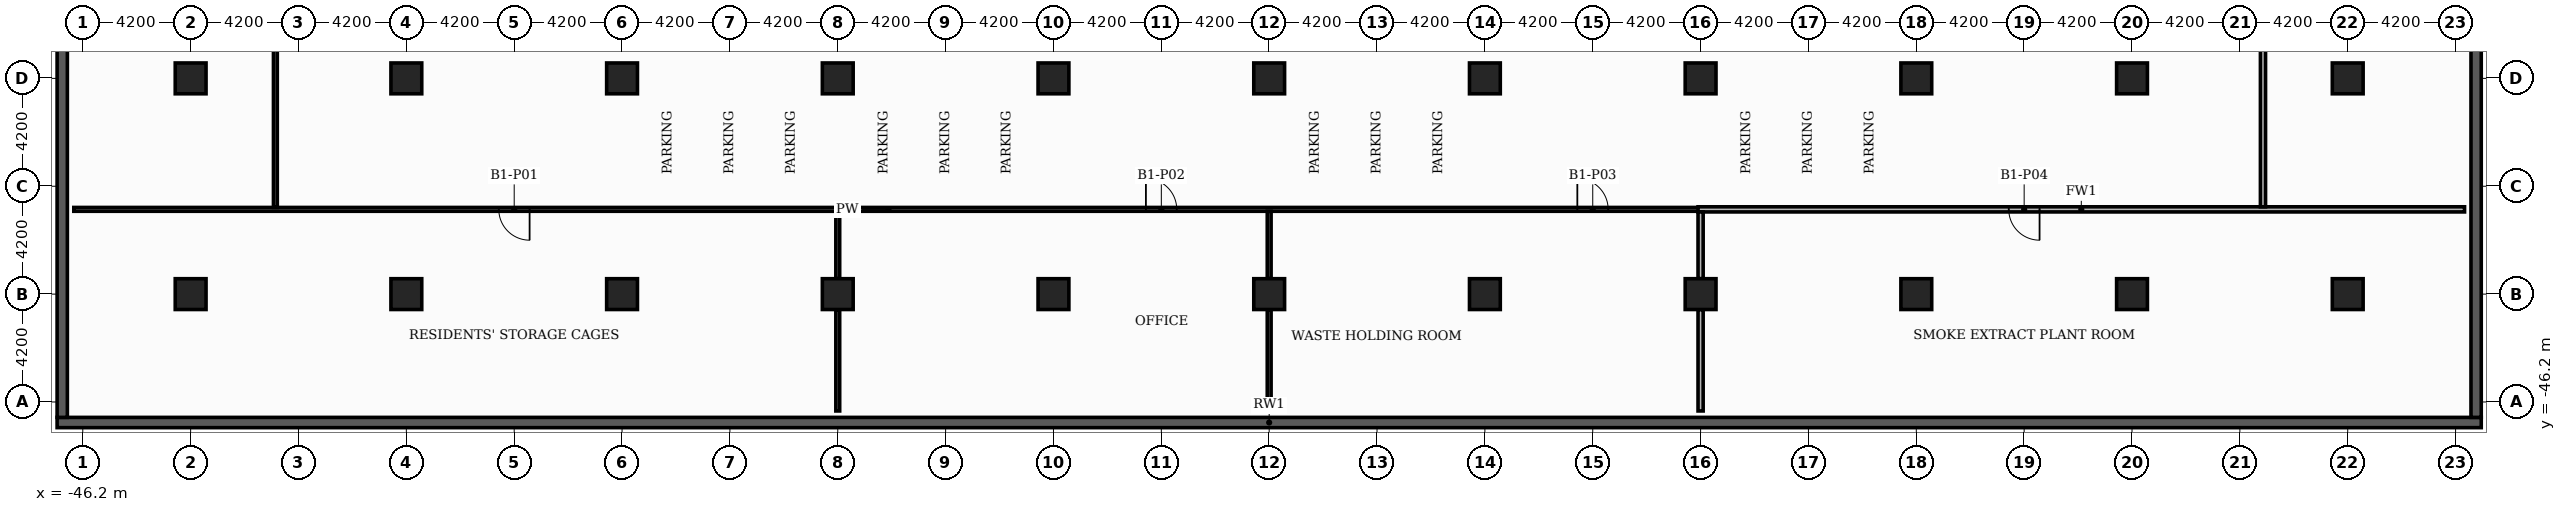
"""IFC4 building model, lengths in metres.
Left out: names, types, materials, properties, quantities, classifications, styles, units other than length and angle.
Written with IfcOpenShell. Run it as: python <this file> out.ifc"""

import sys

from ifc_helpers import new_model, si_unit, direction, frame, frame_2d, origin, origin_2d, place, context, subcontext, project, spatial, rectangle, extrude, element, fill, save


model = new_model("IFC4")
c1 = context("Model", 3, precision=1e-05, world=origin(), true_north=direction((0.0, 1.0)))
c2 = subcontext(c1, "Body", "Model", "MODEL_VIEW")
j1 = project(units=[si_unit("LENGTHUNIT", "METRE"), si_unit("PLANEANGLEUNIT", "RADIAN")], contexts=[c1])
p1 = place(None, origin())
s1 = spatial("IfcSite", under=j1, at=p1, CompositionType="ELEMENT")
p2 = place(p1, origin())
s2 = spatial("IfcBuilding", under=s1, at=p2, CompositionType="ELEMENT")
p3 = place(p2, frame((0.0, 0.0, -4.2)))
s3 = spatial("IfcBuildingStorey", under=s2, at=p3, CompositionType="ELEMENT", Elevation=-4.2)
p4 = place(p3, frame((-47.2, -47.0, 0.0), z_axis=(0.0, 0.0, 1.0), x_axis=(1.0, 0.0, 0.0)))
e1 = element("IfcWall", 1, at=p4, inside=s3, PredefinedType="USERDEFINED", context=c2, shape_type="SweptSolid", body=[
    extrude(rectangle(XDim=94.4, YDim=0.4, at=frame_2d((47.2, 0.0))), origin(), (0.0, 0.0, 1.0), 4.2),
])
for number, where, z_axis, x_axis in (
    (2, (-47.0, -46.8, 0.0), (0.0, 0.0, 1.0), (0.0, 1.0, 0.0)),
    (3, (47.0, -46.8, 0.0), (0.0, 0.0, 1.0), (0.0, 1.0, 0.0)),
):
    element("IfcWall", number, at=place(p3, frame(where, z_axis=z_axis, x_axis=x_axis)), inside=s3, PredefinedType="USERDEFINED", context=c2, shape_type="SweptSolid", body=[
        extrude(rectangle(XDim=93.6, YDim=0.4, at=frame_2d((46.8, 0.0))), origin(), (0.0, 0.0, 1.0), 4.2),
    ])
for number, where, z_axis, x_axis in (
    (4, (0.0, -33.6, 0.0), (0.0, 0.0, 1.0), (1.0, 0.0, 0.0)),
    (5, (0.0, -42.0, 0.0), (0.0, 0.0, 1.0), (1.0, 0.0, 0.0)),
    (6, (8.4, -33.6, 0.0), (0.0, 0.0, 1.0), (1.0, 0.0, 0.0)),
    (7, (8.4, -42.0, 0.0), (0.0, 0.0, 1.0), (1.0, 0.0, 0.0)),
    (8, (16.8, -33.6, 0.0), (0.0, 0.0, 1.0), (1.0, 0.0, 0.0)),
    (9, (16.8, -42.0, 0.0), (0.0, 0.0, 1.0), (1.0, 0.0, 0.0)),
    (10, (25.2, -33.6, 0.0), (0.0, 0.0, 1.0), (1.0, 0.0, 0.0)),
    (11, (25.2, -42.0, 0.0), (0.0, 0.0, 1.0), (1.0, 0.0, 0.0)),
    (12, (33.6, -33.6, 0.0), (0.0, 0.0, 1.0), (1.0, 0.0, 0.0)),
    (13, (33.6, -42.0, 0.0), (0.0, 0.0, 1.0), (1.0, 0.0, 0.0)),
    (14, (42.0, -33.6, 0.0), (0.0, 0.0, 1.0), (1.0, 0.0, 0.0)),
    (15, (42.0, -42.0, 0.0), (0.0, 0.0, 1.0), (1.0, 0.0, 0.0)),
    (16, (-8.4, -33.6, 0.0), (0.0, 0.0, 1.0), (1.0, 0.0, 0.0)),
    (17, (-8.4, -42.0, 0.0), (0.0, 0.0, 1.0), (1.0, 0.0, 0.0)),
    (18, (-16.8, -33.6, 0.0), (0.0, 0.0, 1.0), (1.0, 0.0, 0.0)),
    (19, (-16.8, -42.0, 0.0), (0.0, 0.0, 1.0), (1.0, 0.0, 0.0)),
    (20, (-25.2, -33.6, 0.0), (0.0, 0.0, 1.0), (1.0, 0.0, 0.0)),
    (21, (-25.2, -42.0, 0.0), (0.0, 0.0, 1.0), (1.0, 0.0, 0.0)),
    (22, (-33.6, -33.6, 0.0), (0.0, 0.0, 1.0), (1.0, 0.0, 0.0)),
    (23, (-33.6, -42.0, 0.0), (0.0, 0.0, 1.0), (1.0, 0.0, 0.0)),
    (24, (-42.0, -33.6, 0.0), (0.0, 0.0, 1.0), (1.0, 0.0, 0.0)),
    (25, (-42.0, -42.0, 0.0), (0.0, 0.0, 1.0), (1.0, 0.0, 0.0)),
):
    element("IfcColumn", number, at=place(p3, frame(where, z_axis=z_axis, x_axis=x_axis)), inside=s3, PredefinedType="COLUMN", context=c2, shape_type="SweptSolid", body=[
        extrude(rectangle(XDim=1.2, YDim=1.2, at=origin_2d()), origin(), (0.0, 0.0, 1.0), 4.2),
    ])
p5 = place(p3, frame((-46.55, -38.7, 0.0), z_axis=(0.0, 0.0, 1.0), x_axis=(1.0, 0.0, 0.0)))
e26 = element("IfcWall", 26, at=p5, inside=s3, PredefinedType="PARTITIONING", context=c2, shape_type="SweptSolid", body=[
    extrude(rectangle(XDim=63.45, YDim=0.15, at=frame_2d((31.725, 0.0))), origin(), (0.0, 0.0, 1.0), 3.78),
])
p6 = place(p5, frame((16.55, 0.0, 0.0)))
e27 = element("IfcOpeningElement", 27, at=p6, cuts=e26, PredefinedType="OPENING", context=c2, shape_type="SweptSolid", body=[
    extrude(rectangle(XDim=1.2, YDim=2.2, at=frame_2d((0.6, 1.1))), frame((0.0, 0.085, 0.0), z_axis=(0.0, -1.0, 0.0), x_axis=(1.0, 0.0, 0.0)), (0.0, 0.0, 1.0), 0.17),
])
p7 = place(p5, frame((41.75, 0.0, 0.0)))
e28 = element("IfcOpeningElement", 28, at=p7, cuts=e26, PredefinedType="OPENING", context=c2, shape_type="SweptSolid", body=[
    extrude(rectangle(XDim=1.2, YDim=2.2, at=frame_2d((0.6, 1.1))), frame((0.0, 0.085, 0.0), z_axis=(0.0, -1.0, 0.0), x_axis=(1.0, 0.0, 0.0)), (0.0, 0.0, 1.0), 0.17),
])
p8 = place(p5, frame((58.55, 0.0, 0.0)))
e29 = element("IfcOpeningElement", 29, at=p8, cuts=e26, PredefinedType="OPENING", context=c2, shape_type="SweptSolid", body=[
    extrude(rectangle(XDim=1.2, YDim=2.2, at=frame_2d((0.6, 1.1))), frame((0.0, 0.085, 0.0), z_axis=(0.0, -1.0, 0.0), x_axis=(1.0, 0.0, 0.0)), (0.0, 0.0, 1.0), 0.17),
])
p9 = place(p3, frame((16.7, -38.7, 0.0), z_axis=(0.0, 0.0, 1.0), x_axis=(1.0, 0.0, 0.0)))
e30 = element("IfcWall", 30, at=p9, inside=s3, PredefinedType="PARTITIONING", context=c2, shape_type="SweptSolid", body=[
    extrude(rectangle(XDim=29.85, YDim=0.2, at=frame_2d((14.925, 0.0))), origin(), (0.0, 0.0, 1.0), 3.78),
])
p10 = place(p9, frame((12.1, 0.0, 0.0)))
e31 = element("IfcOpeningElement", 31, at=p10, cuts=e30, PredefinedType="OPENING", context=c2, shape_type="SweptSolid", body=[
    extrude(rectangle(XDim=1.2, YDim=2.2, at=frame_2d((0.6, 1.1))), frame((0.0, 0.11, 0.0), z_axis=(0.0, -1.0, 0.0), x_axis=(1.0, 0.0, 0.0)), (0.0, 0.0, 1.0), 0.22),
])
p11 = place(p3, frame((-38.7, -38.625, 0.0), z_axis=(0.0, 0.0, 1.0), x_axis=(0.0, 1.0, 0.0)))
e32 = element("IfcWall", 32, at=p11, inside=s3, PredefinedType="PARTITIONING", context=c2, shape_type="SweptSolid", body=[
    extrude(rectangle(XDim=72.15, YDim=0.15, at=frame_2d((36.075, 0.0))), origin(), (0.0, 0.0, 1.0), 3.78),
])
p12 = place(p11, frame((8.625, 0.0, 0.0)))
e33 = element("IfcOpeningElement", 33, at=p12, cuts=e32, PredefinedType="OPENING", context=c2, shape_type="SweptSolid", body=[
    extrude(rectangle(XDim=1.2, YDim=2.2, at=frame_2d((0.6, 1.1))), frame((0.0, 0.085, 0.0), z_axis=(0.0, -1.0, 0.0), x_axis=(1.0, 0.0, 0.0)), (0.0, 0.0, 1.0), 0.17),
])
p13 = place(p11, frame((33.825, 0.0, 0.0)))
e34 = element("IfcOpeningElement", 34, at=p13, cuts=e32, PredefinedType="OPENING", context=c2, shape_type="SweptSolid", body=[
    extrude(rectangle(XDim=1.2, YDim=2.2, at=frame_2d((0.6, 1.1))), frame((0.0, 0.085, 0.0), z_axis=(0.0, -1.0, 0.0), x_axis=(1.0, 0.0, 0.0)), (0.0, 0.0, 1.0), 0.17),
])
p14 = place(p11, frame((50.625, 0.0, 0.0)))
e35 = element("IfcOpeningElement", 35, at=p14, cuts=e32, PredefinedType="OPENING", context=c2, shape_type="SweptSolid", body=[
    extrude(rectangle(XDim=1.2, YDim=2.2, at=frame_2d((0.6, 1.1))), frame((0.0, 0.085, 0.0), z_axis=(0.0, -1.0, 0.0), x_axis=(1.0, 0.0, 0.0)), (0.0, 0.0, 1.0), 0.17),
])
p15 = place(p11, frame((67.425, 0.0, 0.0)))
e36 = element("IfcOpeningElement", 36, at=p15, cuts=e32, PredefinedType="OPENING", context=c2, shape_type="SweptSolid", body=[
    extrude(rectangle(XDim=1.2, YDim=2.2, at=frame_2d((0.6, 1.1))), frame((0.0, 0.085, 0.0), z_axis=(0.0, -1.0, 0.0), x_axis=(1.0, 0.0, 0.0)), (0.0, 0.0, 1.0), 0.17),
])
p16 = place(p3, frame((-16.8, -46.55, 0.0), z_axis=(0.0, 0.0, 1.0), x_axis=(0.0, 1.0, 0.0)))
e37 = element("IfcWall", 37, at=p16, inside=s3, PredefinedType="PARTITIONING", context=c2, shape_type="SweptSolid", body=[
    extrude(rectangle(XDim=3.95, YDim=0.15, at=frame_2d((1.975, 0.0))), origin(), (0.0, 0.0, 1.0), 3.78),
])
p17 = place(p3, frame((-16.8, -41.4, 0.0), z_axis=(0.0, 0.0, 1.0), x_axis=(0.0, 1.0, 0.0)))
e38 = element("IfcWall", 38, at=p17, inside=s3, PredefinedType="PARTITIONING", context=c2, shape_type="SweptSolid", body=[
    extrude(rectangle(XDim=2.625, YDim=0.15, at=frame_2d((1.312, 0.0))), origin(), (0.0, 0.0, 1.0), 3.78),
])
p18 = place(p3, frame((0.0, -46.55, 0.0), z_axis=(0.0, 0.0, 1.0), x_axis=(0.0, 1.0, 0.0)))
e39 = element("IfcWall", 39, at=p18, inside=s3, PredefinedType="PARTITIONING", context=c2, shape_type="SweptSolid", body=[
    extrude(rectangle(XDim=3.95, YDim=0.15, at=frame_2d((1.975, 0.0))), origin(), (0.0, 0.0, 1.0), 3.78),
])
p19 = place(p3, frame((0.0, -41.4, 0.0), z_axis=(0.0, 0.0, 1.0), x_axis=(0.0, 1.0, 0.0)))
e40 = element("IfcWall", 40, at=p19, inside=s3, PredefinedType="PARTITIONING", context=c2, shape_type="SweptSolid", body=[
    extrude(rectangle(XDim=2.625, YDim=0.15, at=frame_2d((1.312, 0.0))), origin(), (0.0, 0.0, 1.0), 3.78),
])
p20 = place(p3, frame((16.8, -46.55, 0.0), z_axis=(0.0, 0.0, 1.0), x_axis=(0.0, 1.0, 0.0)))
e41 = element("IfcWall", 41, at=p20, inside=s3, PredefinedType="PARTITIONING", context=c2, shape_type="SweptSolid", body=[
    extrude(rectangle(XDim=3.95, YDim=0.2, at=frame_2d((1.975, 0.0))), origin(), (0.0, 0.0, 1.0), 3.78),
])
p21 = place(p3, frame((16.8, -41.4, 0.0), z_axis=(0.0, 0.0, 1.0), x_axis=(0.0, 1.0, 0.0)))
e42 = element("IfcWall", 42, at=p21, inside=s3, PredefinedType="PARTITIONING", context=c2, shape_type="SweptSolid", body=[
    extrude(rectangle(XDim=2.6, YDim=0.2, at=frame_2d((1.3, 0.0))), origin(), (0.0, 0.0, 1.0), 3.78),
])
p22 = place(p3, frame((38.7, -38.6, 0.0), z_axis=(0.0, 0.0, 1.0), x_axis=(0.0, 1.0, 0.0)))
e43 = element("IfcWall", 43, at=p22, inside=s3, PredefinedType="PARTITIONING", context=c2, shape_type="SweptSolid", body=[
    extrude(rectangle(XDim=71.6, YDim=0.2, at=frame_2d((35.8, 0.0))), origin(), (0.0, 0.0, 1.0), 3.78),
])
p23 = place(p22, frame((8.6, 0.0, 0.0)))
e44 = element("IfcOpeningElement", 44, at=p23, cuts=e43, PredefinedType="OPENING", context=c2, shape_type="SweptSolid", body=[
    extrude(rectangle(XDim=1.2, YDim=2.2, at=frame_2d((0.6, 1.1))), frame((0.0, 0.11, 0.0), z_axis=(0.0, -1.0, 0.0), x_axis=(1.0, 0.0, 0.0)), (0.0, 0.0, 1.0), 0.22),
])
p24 = place(p22, frame((33.8, 0.0, 0.0)))
e45 = element("IfcOpeningElement", 45, at=p24, cuts=e43, PredefinedType="OPENING", context=c2, shape_type="SweptSolid", body=[
    extrude(rectangle(XDim=1.2, YDim=2.2, at=frame_2d((0.6, 1.1))), frame((0.0, 0.11, 0.0), z_axis=(0.0, -1.0, 0.0), x_axis=(1.0, 0.0, 0.0)), (0.0, 0.0, 1.0), 0.22),
])
p25 = place(p22, frame((50.6, 0.0, 0.0)))
e46 = element("IfcOpeningElement", 46, at=p25, cuts=e43, PredefinedType="OPENING", context=c2, shape_type="SweptSolid", body=[
    extrude(rectangle(XDim=1.2, YDim=2.2, at=frame_2d((0.6, 1.1))), frame((0.0, 0.11, 0.0), z_axis=(0.0, -1.0, 0.0), x_axis=(1.0, 0.0, 0.0)), (0.0, 0.0, 1.0), 0.22),
])
p26 = place(p22, frame((67.4, 0.0, 0.0)))
e47 = element("IfcOpeningElement", 47, at=p26, cuts=e43, PredefinedType="OPENING", context=c2, shape_type="SweptSolid", body=[
    extrude(rectangle(XDim=1.2, YDim=2.2, at=frame_2d((0.6, 1.1))), frame((0.0, 0.11, 0.0), z_axis=(0.0, -1.0, 0.0), x_axis=(1.0, 0.0, 0.0)), (0.0, 0.0, 1.0), 0.22),
])
p27 = place(p6, origin())
e48 = element("IfcDoor", 48, at=p27, inside=s3, OperationType="SINGLE_SWING_RIGHT", PredefinedType="DOOR", context=c2, shape_type="SweptSolid", body=[
    extrude(rectangle(XDim=1.2, YDim=2.2, at=frame_2d((0.6, 1.1))), frame((0.0, 0.025, 0.0), z_axis=(0.0, -1.0, 0.0), x_axis=(1.0, 0.0, 0.0)), (0.0, 0.0, 1.0), 0.05),
])
fill(e27, e48)
p28 = place(p7, origin())
e49 = element("IfcDoor", 49, at=p28, inside=s3, OperationType="SINGLE_SWING_LEFT", PredefinedType="DOOR", context=c2, shape_type="SweptSolid", body=[
    extrude(rectangle(XDim=1.2, YDim=2.2, at=frame_2d((0.6, 1.1))), frame((0.0, 0.025, 0.0), z_axis=(0.0, -1.0, 0.0), x_axis=(1.0, 0.0, 0.0)), (0.0, 0.0, 1.0), 0.05),
])
fill(e28, e49)
p29 = place(p8, origin())
e50 = element("IfcDoor", 50, at=p29, inside=s3, OperationType="SINGLE_SWING_LEFT", PredefinedType="DOOR", context=c2, shape_type="SweptSolid", body=[
    extrude(rectangle(XDim=1.2, YDim=2.2, at=frame_2d((0.6, 1.1))), frame((0.0, 0.025, 0.0), z_axis=(0.0, -1.0, 0.0), x_axis=(1.0, 0.0, 0.0)), (0.0, 0.0, 1.0), 0.05),
])
fill(e29, e50)
p30 = place(p10, origin())
e51 = element("IfcDoor", 51, at=p30, inside=s3, OperationType="SINGLE_SWING_RIGHT", PredefinedType="DOOR", context=c2, shape_type="SweptSolid", body=[
    extrude(rectangle(XDim=1.2, YDim=2.2, at=frame_2d((0.6, 1.1))), frame((0.0, 0.025, 0.0), z_axis=(0.0, -1.0, 0.0), x_axis=(1.0, 0.0, 0.0)), (0.0, 0.0, 1.0), 0.05),
])
fill(e31, e51)
save(model, sys.argv[1])
